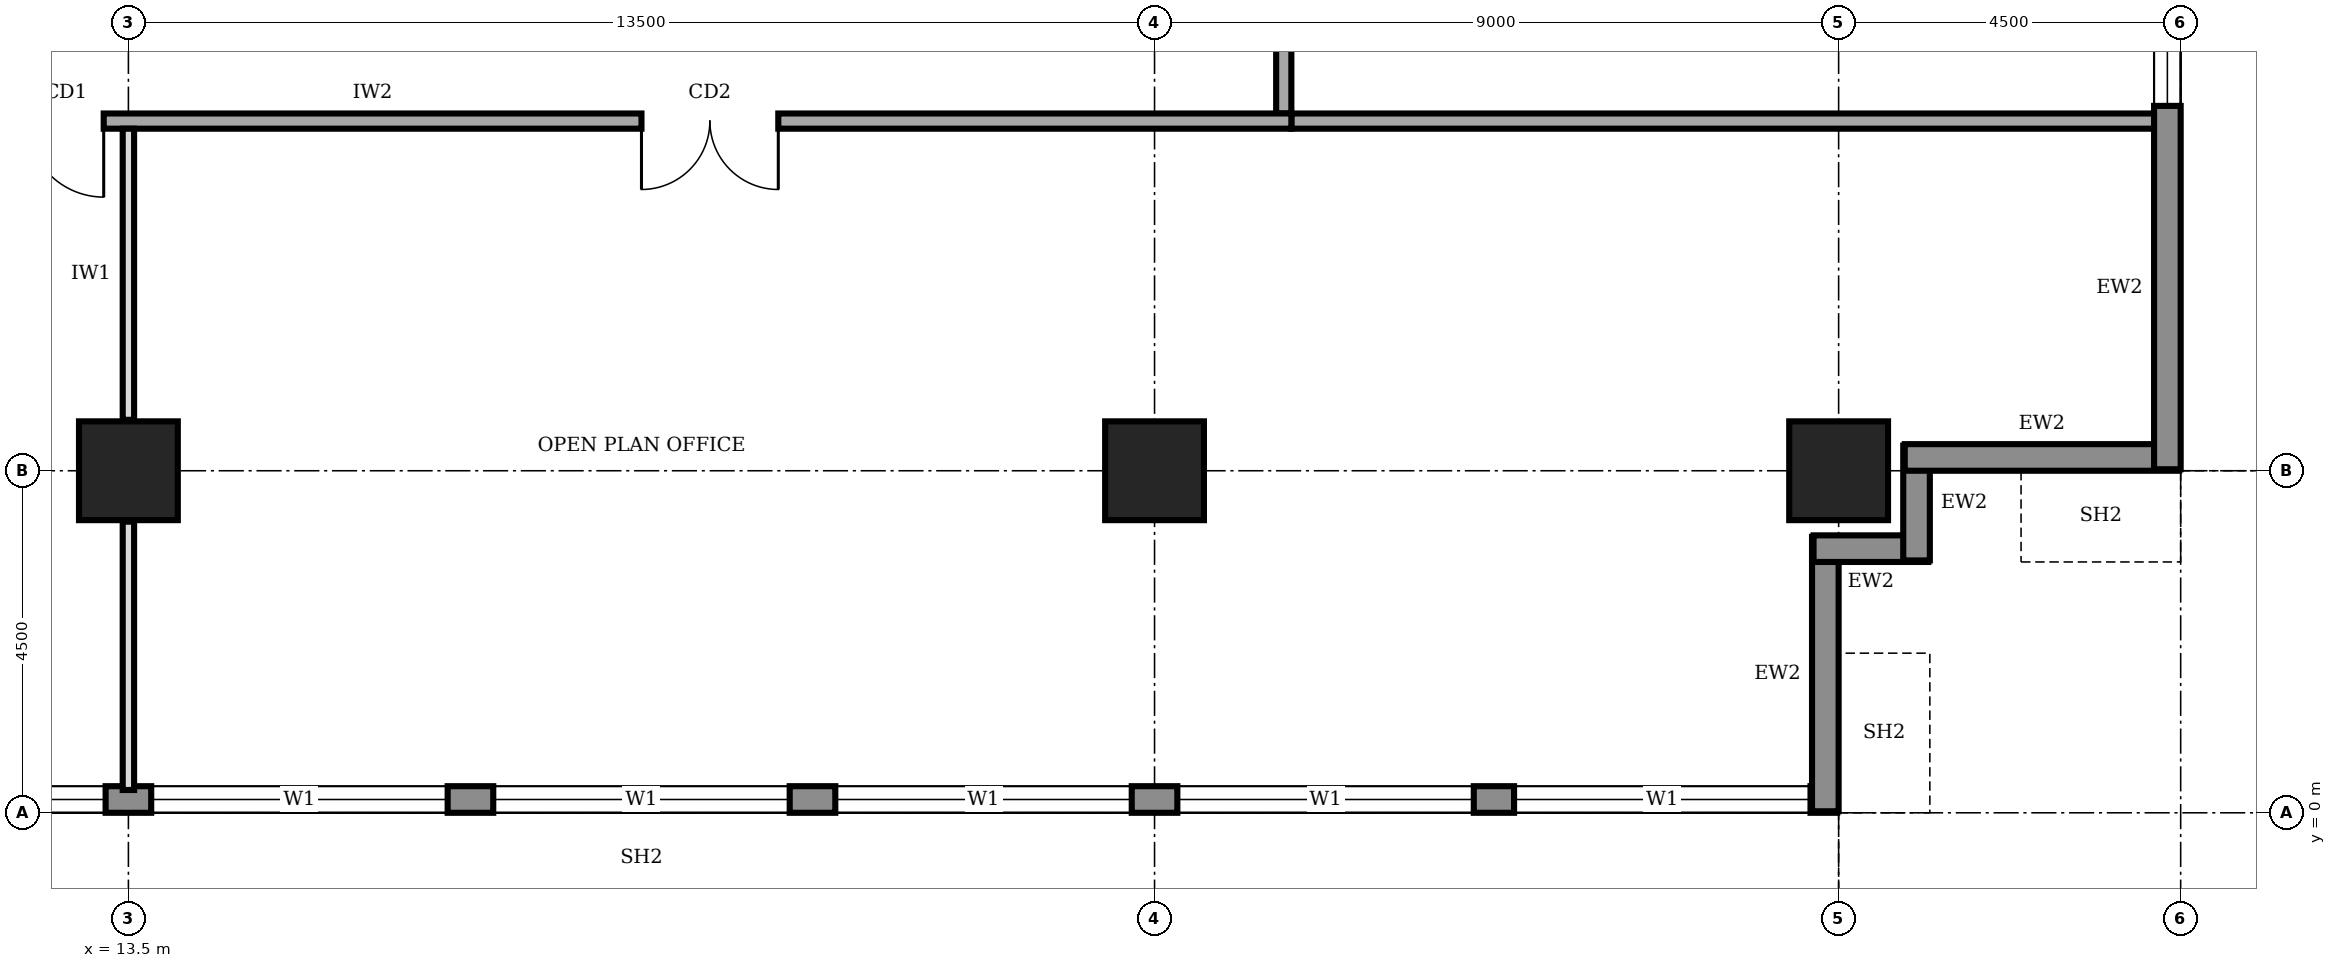
"""IFC4 building model, lengths in metres.
Left out: names, types, materials, properties, quantities, classifications, styles, units other than length and angle.
Written with IfcOpenShell. Run it as: python <this file> out.ifc"""

import sys

from ifc_helpers import new_model, si_unit, direction, frame, frame_2d, origin, origin_2d, place, context, subcontext, project, spatial, rectangle, extrude, element, fill, save


model = new_model("IFC4")
c1 = context("Model", 3, precision=1e-05, world=origin(), true_north=direction((0.0, 1.0)))
c2 = subcontext(c1, "Body", "Model", "MODEL_VIEW")
j1 = project(units=[si_unit("LENGTHUNIT", "METRE"), si_unit("PLANEANGLEUNIT", "RADIAN")], contexts=[c1])
p1 = place(None, origin())
s1 = spatial("IfcSite", under=j1, at=p1, CompositionType="ELEMENT")
p2 = place(p1, origin())
s2 = spatial("IfcBuilding", under=s1, at=p2, CompositionType="ELEMENT")
p3 = place(p2, frame((0.0, 0.0, 277.0)))
s3 = spatial("IfcBuildingStorey", under=s2, at=p3, CompositionType="ELEMENT", Elevation=277.0)
for number, where, z_axis, x_axis in (
    (1, (13.5, 4.5, 0.0), (0.0, 0.0, 1.0), (1.0, 0.0, 0.0)),
    (2, (27.0, 4.5, 0.0), (0.0, 0.0, 1.0), (1.0, 0.0, 0.0)),
    (3, (36.0, 4.5, 0.0), (0.0, 0.0, 1.0), (1.0, 0.0, 0.0)),
):
    element("IfcColumn", number, at=place(p3, frame(where, z_axis=z_axis, x_axis=x_axis)), inside=s3, PredefinedType="COLUMN", context=c2, shape_type="SweptSolid", body=[
        extrude(rectangle(XDim=1.3, YDim=1.3, at=origin_2d()), origin(), (0.0, 0.0, 1.0), 4.0),
    ])
p4 = place(p3, frame((4.52, 0.175, 0.0), z_axis=(0.0, 0.0, 1.0), x_axis=(1.0, 0.0, 0.0)))
e4 = element("IfcWall", 4, at=p4, inside=s3, PredefinedType="STANDARD", context=c2, shape_type="SweptSolid", body=[
    extrude(rectangle(XDim=31.46, YDim=0.35, at=frame_2d((15.73, 0.0))), origin(), (0.0, 0.0, 1.0), 3.75),
])
p5 = place(p4, frame((4.78, 0.0, 0.9)))
e5 = element("IfcOpeningElement", 5, at=p5, cuts=e4, PredefinedType="OPENING", context=c2, shape_type="SweptSolid", body=[
    extrude(rectangle(XDim=3.9, YDim=2.2, at=frame_2d((1.95, 1.1))), frame((0.0, 0.185, 0.0), z_axis=(0.0, -1.0, 0.0), x_axis=(1.0, 0.0, 0.0)), (0.0, 0.0, 1.0), 0.37),
])
p6 = place(p4, frame((9.28, 0.0, 0.9)))
e6 = element("IfcOpeningElement", 6, at=p6, cuts=e4, PredefinedType="OPENING", context=c2, shape_type="SweptSolid", body=[
    extrude(rectangle(XDim=3.9, YDim=2.2, at=frame_2d((1.95, 1.1))), frame((0.0, 0.185, 0.0), z_axis=(0.0, -1.0, 0.0), x_axis=(1.0, 0.0, 0.0)), (0.0, 0.0, 1.0), 0.37),
])
p7 = place(p4, frame((13.78, 0.0, 0.9)))
e7 = element("IfcOpeningElement", 7, at=p7, cuts=e4, PredefinedType="OPENING", context=c2, shape_type="SweptSolid", body=[
    extrude(rectangle(XDim=3.9, YDim=2.2, at=frame_2d((1.95, 1.1))), frame((0.0, 0.185, 0.0), z_axis=(0.0, -1.0, 0.0), x_axis=(1.0, 0.0, 0.0)), (0.0, 0.0, 1.0), 0.37),
])
p8 = place(p4, frame((18.28, 0.0, 0.9)))
e8 = element("IfcOpeningElement", 8, at=p8, cuts=e4, PredefinedType="OPENING", context=c2, shape_type="SweptSolid", body=[
    extrude(rectangle(XDim=3.9, YDim=2.2, at=frame_2d((1.95, 1.1))), frame((0.0, 0.185, 0.0), z_axis=(0.0, -1.0, 0.0), x_axis=(1.0, 0.0, 0.0)), (0.0, 0.0, 1.0), 0.37),
])
p9 = place(p4, frame((22.78, 0.0, 0.9)))
e9 = element("IfcOpeningElement", 9, at=p9, cuts=e4, PredefinedType="OPENING", context=c2, shape_type="SweptSolid", body=[
    extrude(rectangle(XDim=3.9, YDim=2.2, at=frame_2d((1.95, 1.1))), frame((0.0, 0.185, 0.0), z_axis=(0.0, -1.0, 0.0), x_axis=(1.0, 0.0, 0.0)), (0.0, 0.0, 1.0), 0.37),
])
p10 = place(p4, frame((27.21, 0.0, 0.9)))
e10 = element("IfcOpeningElement", 10, at=p10, cuts=e4, PredefinedType="OPENING", context=c2, shape_type="SweptSolid", body=[
    extrude(rectangle(XDim=3.9, YDim=2.2, at=frame_2d((1.95, 1.1))), frame((0.0, 0.185, 0.0), z_axis=(0.0, -1.0, 0.0), x_axis=(1.0, 0.0, 0.0)), (0.0, 0.0, 1.0), 0.37),
])
p11 = place(p3, frame((35.825, 0.02, 0.0), z_axis=(0.0, 0.0, 1.0), x_axis=(0.0, 1.0, 0.0)))
e11 = element("IfcWall", 11, at=p11, inside=s3, PredefinedType="STANDARD", context=c2, shape_type="SweptSolid", body=[
    extrude(rectangle(XDim=3.61, YDim=0.35, at=frame_2d((1.805, 0.0))), origin(), (0.0, 0.0, 1.0), 2.85),
])
for number, where, z_axis, x_axis in (
    (12, (35.67, 3.475, 0.0), (0.0, 0.0, 1.0), (1.0, 0.0, 0.0)),
    (13, (37.025, 3.32, 0.0), (0.0, 0.0, 1.0), (0.0, 1.0, 0.0)),
):
    element("IfcWall", number, at=place(p3, frame(where, z_axis=z_axis, x_axis=x_axis)), inside=s3, PredefinedType="STANDARD", context=c2, shape_type="SweptSolid", body=[
        extrude(rectangle(XDim=1.51, YDim=0.35, at=frame_2d((0.755, 0.0))), origin(), (0.0, 0.0, 1.0), 3.75),
    ])
p12 = place(p3, frame((36.87, 4.675, 0.0), z_axis=(0.0, 0.0, 1.0), x_axis=(1.0, 0.0, 0.0)))
e14 = element("IfcWall", 14, at=p12, inside=s3, PredefinedType="STANDARD", context=c2, shape_type="SweptSolid", body=[
    extrude(rectangle(XDim=3.61, YDim=0.35, at=frame_2d((1.805, 0.0))), origin(), (0.0, 0.0, 1.0), 2.85),
])
p13 = place(p3, frame((40.325, 4.52, 0.0), z_axis=(0.0, 0.0, 1.0), x_axis=(0.0, 1.0, 0.0)))
e15 = element("IfcWall", 15, at=p13, inside=s3, PredefinedType="STANDARD", context=c2, shape_type="SweptSolid", body=[
    extrude(rectangle(XDim=31.46, YDim=0.35, at=frame_2d((15.73, 0.0))), origin(), (0.0, 0.0, 1.0), 3.75),
])
p14 = place(p13, frame((4.78, 0.0, 0.9)))
e16 = element("IfcOpeningElement", 16, at=p14, cuts=e15, PredefinedType="OPENING", context=c2, shape_type="SweptSolid", body=[
    extrude(rectangle(XDim=3.9, YDim=2.2, at=frame_2d((1.95, 1.1))), frame((0.0, 0.185, 0.0), z_axis=(0.0, -1.0, 0.0), x_axis=(1.0, 0.0, 0.0)), (0.0, 0.0, 1.0), 0.37),
])
p15 = place(p13, frame((9.28, 0.0, 0.9)))
e17 = element("IfcOpeningElement", 17, at=p15, cuts=e15, PredefinedType="OPENING", context=c2, shape_type="SweptSolid", body=[
    extrude(rectangle(XDim=3.9, YDim=2.2, at=frame_2d((1.95, 1.1))), frame((0.0, 0.185, 0.0), z_axis=(0.0, -1.0, 0.0), x_axis=(1.0, 0.0, 0.0)), (0.0, 0.0, 1.0), 0.37),
])
p16 = place(p13, frame((13.78, 0.0, 0.9)))
e18 = element("IfcOpeningElement", 18, at=p16, cuts=e15, PredefinedType="OPENING", context=c2, shape_type="SweptSolid", body=[
    extrude(rectangle(XDim=3.9, YDim=2.2, at=frame_2d((1.95, 1.1))), frame((0.0, 0.185, 0.0), z_axis=(0.0, -1.0, 0.0), x_axis=(1.0, 0.0, 0.0)), (0.0, 0.0, 1.0), 0.37),
])
p17 = place(p13, frame((18.28, 0.0, 0.9)))
e19 = element("IfcOpeningElement", 19, at=p17, cuts=e15, PredefinedType="OPENING", context=c2, shape_type="SweptSolid", body=[
    extrude(rectangle(XDim=3.9, YDim=2.2, at=frame_2d((1.95, 1.1))), frame((0.0, 0.185, 0.0), z_axis=(0.0, -1.0, 0.0), x_axis=(1.0, 0.0, 0.0)), (0.0, 0.0, 1.0), 0.37),
])
p18 = place(p13, frame((22.78, 0.0, 0.9)))
e20 = element("IfcOpeningElement", 20, at=p18, cuts=e15, PredefinedType="OPENING", context=c2, shape_type="SweptSolid", body=[
    extrude(rectangle(XDim=3.9, YDim=2.2, at=frame_2d((1.95, 1.1))), frame((0.0, 0.185, 0.0), z_axis=(0.0, -1.0, 0.0), x_axis=(1.0, 0.0, 0.0)), (0.0, 0.0, 1.0), 0.37),
])
p19 = place(p13, frame((27.21, 0.0, 0.9)))
e21 = element("IfcOpeningElement", 21, at=p19, cuts=e15, PredefinedType="OPENING", context=c2, shape_type="SweptSolid", body=[
    extrude(rectangle(XDim=3.9, YDim=2.2, at=frame_2d((1.95, 1.1))), frame((0.0, 0.185, 0.0), z_axis=(0.0, -1.0, 0.0), x_axis=(1.0, 0.0, 0.0)), (0.0, 0.0, 1.0), 0.37),
])
p20 = place(p3, frame((11.9, 9.1, 0.0), z_axis=(0.0, 0.0, 1.0), x_axis=(1.0, 0.0, 0.0)))
e22 = element("IfcWall", 22, at=p20, inside=s3, PredefinedType="SOLIDWALL", context=c2, shape_type="SweptSolid", body=[
    extrude(rectangle(XDim=16.9, YDim=0.2, at=frame_2d((8.45, 0.0))), origin(), (0.0, 0.0, 1.0), 3.75),
])
p21 = place(p20, frame((0.275, 0.0, 0.0)))
e23 = element("IfcOpeningElement", 23, at=p21, cuts=e22, PredefinedType="OPENING", context=c2, shape_type="SweptSolid", body=[
    extrude(rectangle(XDim=1.0, YDim=2.1, at=frame_2d((0.5, 1.05))), frame((0.0, 0.11, 0.0), z_axis=(0.0, -1.0, 0.0), x_axis=(1.0, 0.0, 0.0)), (0.0, 0.0, 1.0), 0.22),
])
p22 = place(p20, frame((8.35, 0.0, 0.0)))
e24 = element("IfcOpeningElement", 24, at=p22, cuts=e22, PredefinedType="OPENING", context=c2, shape_type="SweptSolid", body=[
    extrude(rectangle(XDim=1.8, YDim=2.1, at=frame_2d((0.9, 1.05))), frame((0.0, 0.11, 0.0), z_axis=(0.0, -1.0, 0.0), x_axis=(1.0, 0.0, 0.0)), (0.0, 0.0, 1.0), 0.22),
])
p23 = place(p3, frame((28.7, 9.2, 0.0), z_axis=(0.0, 0.0, 1.0), x_axis=(0.0, 1.0, 0.0)))
e25 = element("IfcWall", 25, at=p23, inside=s3, PredefinedType="SOLIDWALL", context=c2, shape_type="SweptSolid", body=[
    extrude(rectangle(XDim=23.8, YDim=0.2, at=frame_2d((11.9, 0.0))), origin(), (0.0, 0.0, 1.0), 3.75),
])
p24 = place(p23, frame((3.4, 0.0, 0.0)))
e26 = element("IfcOpeningElement", 26, at=p24, cuts=e25, PredefinedType="OPENING", context=c2, shape_type="SweptSolid", body=[
    extrude(rectangle(XDim=1.8, YDim=2.1, at=frame_2d((0.9, 1.05))), frame((0.0, 0.11, 0.0), z_axis=(0.0, -1.0, 0.0), x_axis=(1.0, 0.0, 0.0)), (0.0, 0.0, 1.0), 0.22),
])
p25 = place(p23, frame((10.55, 0.0, 0.0)))
e27 = element("IfcOpeningElement", 27, at=p25, cuts=e25, PredefinedType="OPENING", context=c2, shape_type="SweptSolid", body=[
    extrude(rectangle(XDim=1.0, YDim=2.1, at=frame_2d((0.5, 1.05))), frame((0.0, 0.11, 0.0), z_axis=(0.0, -1.0, 0.0), x_axis=(1.0, 0.0, 0.0)), (0.0, 0.0, 1.0), 0.22),
])
p26 = place(p23, frame((17.65, 0.0, 0.0)))
e28 = element("IfcOpeningElement", 28, at=p26, cuts=e25, PredefinedType="OPENING", context=c2, shape_type="SweptSolid", body=[
    extrude(rectangle(XDim=1.8, YDim=2.1, at=frame_2d((0.9, 1.05))), frame((0.0, 0.11, 0.0), z_axis=(0.0, -1.0, 0.0), x_axis=(1.0, 0.0, 0.0)), (0.0, 0.0, 1.0), 0.22),
])
p27 = place(p3, frame((28.8, 9.1, 0.0), z_axis=(0.0, 0.0, 1.0), x_axis=(1.0, 0.0, 0.0)))
e29 = element("IfcWall", 29, at=p27, inside=s3, PredefinedType="SOLIDWALL", context=c2, shape_type="SweptSolid", body=[
    extrude(rectangle(XDim=11.4, YDim=0.2, at=frame_2d((5.7, 0.0))), origin(), (0.0, 0.0, 1.0), 3.75),
])
p28 = place(p3, frame((13.5, 0.3, 0.0), z_axis=(0.0, 0.0, 1.0), x_axis=(0.0, 1.0, 0.0)))
e30 = element("IfcWall", 30, at=p28, inside=s3, PredefinedType="PARTITIONING", context=c2, shape_type="SweptSolid", body=[
    extrude(rectangle(XDim=3.53, YDim=0.15, at=frame_2d((1.765, 0.0))), origin(), (0.0, 0.0, 1.0), 2.85),
])
p29 = place(p3, frame((13.5, 5.17, 0.0), z_axis=(0.0, 0.0, 1.0), x_axis=(0.0, 1.0, 0.0)))
e31 = element("IfcWall", 31, at=p29, inside=s3, PredefinedType="PARTITIONING", context=c2, shape_type="SweptSolid", body=[
    extrude(rectangle(XDim=3.83, YDim=0.15, at=frame_2d((1.915, 0.0))), origin(), (0.0, 0.0, 1.0), 2.85),
])
p30 = place(p5, origin())
e32 = element("IfcWindow", 32, at=p30, inside=s3, PartitioningType="SINGLE_PANEL", PredefinedType="WINDOW", context=c2, shape_type="SweptSolid", body=[
    extrude(rectangle(XDim=3.9, YDim=2.2, at=frame_2d((1.95, 1.1))), frame((0.0, 0.03, 0.0), z_axis=(0.0, -1.0, 0.0), x_axis=(1.0, 0.0, 0.0)), (0.0, 0.0, 1.0), 0.06),
])
fill(e5, e32)
p31 = place(p6, origin())
e33 = element("IfcWindow", 33, at=p31, inside=s3, PartitioningType="SINGLE_PANEL", PredefinedType="WINDOW", context=c2, shape_type="SweptSolid", body=[
    extrude(rectangle(XDim=3.9, YDim=2.2, at=frame_2d((1.95, 1.1))), frame((0.0, 0.03, 0.0), z_axis=(0.0, -1.0, 0.0), x_axis=(1.0, 0.0, 0.0)), (0.0, 0.0, 1.0), 0.06),
])
fill(e6, e33)
p32 = place(p7, origin())
e34 = element("IfcWindow", 34, at=p32, inside=s3, PartitioningType="SINGLE_PANEL", PredefinedType="WINDOW", context=c2, shape_type="SweptSolid", body=[
    extrude(rectangle(XDim=3.9, YDim=2.2, at=frame_2d((1.95, 1.1))), frame((0.0, 0.03, 0.0), z_axis=(0.0, -1.0, 0.0), x_axis=(1.0, 0.0, 0.0)), (0.0, 0.0, 1.0), 0.06),
])
fill(e7, e34)
p33 = place(p8, origin())
e35 = element("IfcWindow", 35, at=p33, inside=s3, PartitioningType="SINGLE_PANEL", PredefinedType="WINDOW", context=c2, shape_type="SweptSolid", body=[
    extrude(rectangle(XDim=3.9, YDim=2.2, at=frame_2d((1.95, 1.1))), frame((0.0, 0.03, 0.0), z_axis=(0.0, -1.0, 0.0), x_axis=(1.0, 0.0, 0.0)), (0.0, 0.0, 1.0), 0.06),
])
fill(e8, e35)
p34 = place(p9, origin())
e36 = element("IfcWindow", 36, at=p34, inside=s3, PartitioningType="SINGLE_PANEL", PredefinedType="WINDOW", context=c2, shape_type="SweptSolid", body=[
    extrude(rectangle(XDim=3.9, YDim=2.2, at=frame_2d((1.95, 1.1))), frame((0.0, 0.03, 0.0), z_axis=(0.0, -1.0, 0.0), x_axis=(1.0, 0.0, 0.0)), (0.0, 0.0, 1.0), 0.06),
])
fill(e9, e36)
p35 = place(p10, origin())
e37 = element("IfcWindow", 37, at=p35, inside=s3, PartitioningType="SINGLE_PANEL", PredefinedType="WINDOW", context=c2, shape_type="SweptSolid", body=[
    extrude(rectangle(XDim=3.9, YDim=2.2, at=frame_2d((1.95, 1.1))), frame((0.0, 0.03, 0.0), z_axis=(0.0, -1.0, 0.0), x_axis=(1.0, 0.0, 0.0)), (0.0, 0.0, 1.0), 0.06),
])
fill(e10, e37)
p36 = place(p14, origin())
e38 = element("IfcWindow", 38, at=p36, inside=s3, PartitioningType="SINGLE_PANEL", PredefinedType="WINDOW", context=c2, shape_type="SweptSolid", body=[
    extrude(rectangle(XDim=3.9, YDim=2.2, at=frame_2d((1.95, 1.1))), frame((0.0, 0.03, 0.0), z_axis=(0.0, -1.0, 0.0), x_axis=(1.0, 0.0, 0.0)), (0.0, 0.0, 1.0), 0.06),
])
fill(e16, e38)
p37 = place(p21, frame((1.0, 0.0, 0.0), z_axis=(0.0, 0.0, 1.0), x_axis=(-1.0, 0.0, 0.0)))
e39 = element("IfcDoor", 39, at=p37, inside=s3, OperationType="SINGLE_SWING_LEFT", PredefinedType="DOOR", context=c2, shape_type="SweptSolid", body=[
    extrude(rectangle(XDim=1.0, YDim=2.1, at=frame_2d((0.5, 1.05))), frame((0.0, 0.025, 0.0), z_axis=(0.0, -1.0, 0.0), x_axis=(1.0, 0.0, 0.0)), (0.0, 0.0, 1.0), 0.05),
])
fill(e23, e39)
p38 = place(p22, frame((1.8, 0.0, 0.0), z_axis=(0.0, 0.0, 1.0), x_axis=(-1.0, 0.0, 0.0)))
e40 = element("IfcDoor", 40, at=p38, inside=s3, OperationType="DOUBLE_DOOR_SINGLE_SWING", PredefinedType="DOOR", context=c2, shape_type="SweptSolid", body=[
    extrude(rectangle(XDim=1.8, YDim=2.1, at=frame_2d((0.9, 1.05))), frame((0.0, 0.025, 0.0), z_axis=(0.0, -1.0, 0.0), x_axis=(1.0, 0.0, 0.0)), (0.0, 0.0, 1.0), 0.05),
])
fill(e24, e40)
save(model, sys.argv[1])
